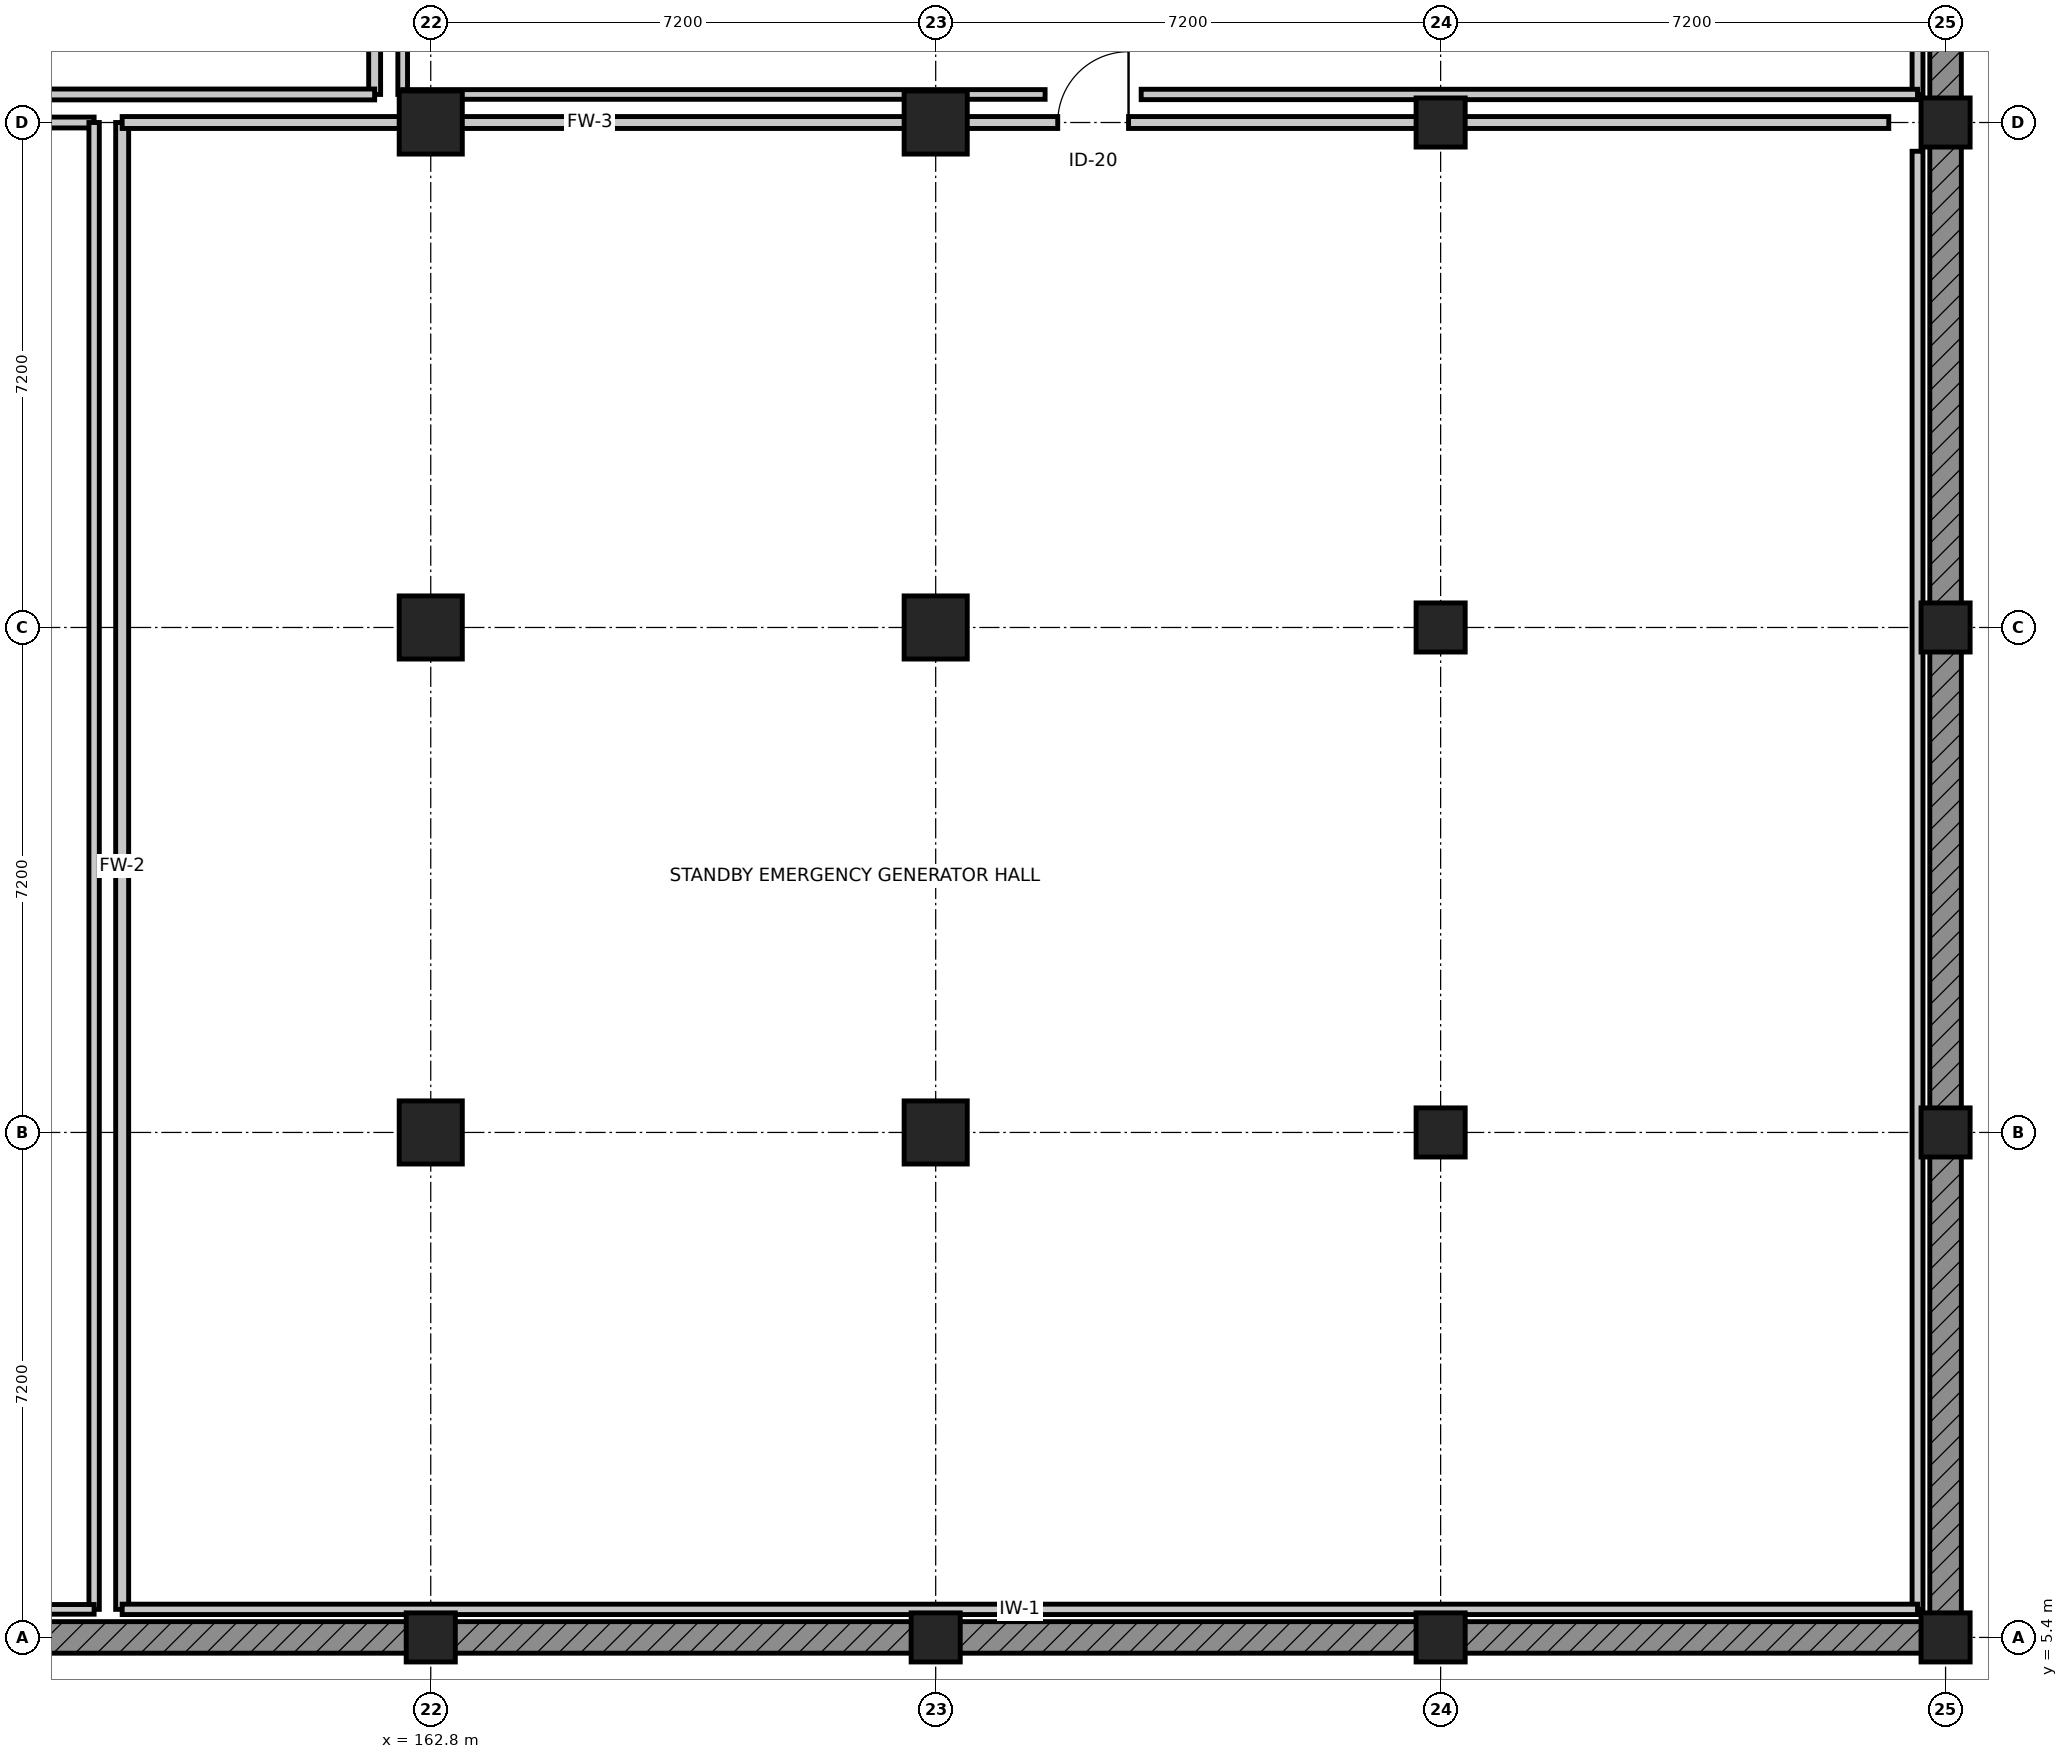
"""IFC4 building model, lengths in metres.
Left out: names, types, materials, properties, quantities, classifications, styles, units other than length and angle.
Written with IfcOpenShell. Run it as: python <this file> out.ifc"""

import sys

from ifc_helpers import new_model, si_unit, direction, frame, frame_2d, origin, origin_2d, place, context, subcontext, project, spatial, rectangle, extrude, element, fill, save


model = new_model("IFC4")
c1 = context("Model", 3, precision=1e-05, world=origin(), true_north=direction((0.0, 1.0)))
c2 = subcontext(c1, "Body", "Model", "MODEL_VIEW")
j1 = project(units=[si_unit("LENGTHUNIT", "METRE"), si_unit("PLANEANGLEUNIT", "RADIAN")], contexts=[c1])
p1 = place(None, origin())
s1 = spatial("IfcSite", under=j1, at=p1, CompositionType="ELEMENT")
p2 = place(p1, origin())
s2 = spatial("IfcBuilding", under=s1, at=p2, CompositionType="ELEMENT")
p3 = place(p2, frame((0.0, 0.0, -4.5)))
s3 = spatial("IfcBuildingStorey", under=s2, at=p3, CompositionType="ELEMENT", Elevation=-4.5)
p4 = place(p3, frame((162.8, 5.4, 0.0), z_axis=(0.0, 0.0, 1.0), x_axis=(1.0, 0.0, 0.0)))
e1 = element("IfcColumn", 1, at=p4, inside=s3, PredefinedType="COLUMN", context=c2, shape_type="SweptSolid", body=[
    extrude(rectangle(XDim=0.7, YDim=0.7, at=origin_2d()), origin(), (0.0, 0.0, 1.0), 4.5),
])
for number, where, z_axis, x_axis in (
    (2, (162.8, 12.6, 0.0), (0.0, 0.0, 1.0), (1.0, 0.0, 0.0)),
    (3, (162.8, 19.8, 0.0), (0.0, 0.0, 1.0), (1.0, 0.0, 0.0)),
    (4, (162.8, 27.0, 0.0), (0.0, 0.0, 1.0), (1.0, 0.0, 0.0)),
):
    element("IfcColumn", number, at=place(p3, frame(where, z_axis=z_axis, x_axis=x_axis)), inside=s3, PredefinedType="COLUMN", context=c2, shape_type="SweptSolid", body=[
        extrude(rectangle(XDim=0.9, YDim=0.9, at=origin_2d()), origin(), (0.0, 0.0, 1.0), 4.5),
    ])
p5 = place(p3, frame((170.0, 5.4, 0.0), z_axis=(0.0, 0.0, 1.0), x_axis=(1.0, 0.0, 0.0)))
e5 = element("IfcColumn", 5, at=p5, inside=s3, PredefinedType="COLUMN", context=c2, shape_type="SweptSolid", body=[
    extrude(rectangle(XDim=0.7, YDim=0.7, at=origin_2d()), origin(), (0.0, 0.0, 1.0), 4.5),
])
for number, where, z_axis, x_axis in (
    (6, (170.0, 12.6, 0.0), (0.0, 0.0, 1.0), (1.0, 0.0, 0.0)),
    (7, (170.0, 19.8, 0.0), (0.0, 0.0, 1.0), (1.0, 0.0, 0.0)),
    (8, (170.0, 27.0, 0.0), (0.0, 0.0, 1.0), (1.0, 0.0, 0.0)),
):
    element("IfcColumn", number, at=place(p3, frame(where, z_axis=z_axis, x_axis=x_axis)), inside=s3, PredefinedType="COLUMN", context=c2, shape_type="SweptSolid", body=[
        extrude(rectangle(XDim=0.9, YDim=0.9, at=origin_2d()), origin(), (0.0, 0.0, 1.0), 4.5),
    ])
for number, where, z_axis, x_axis in (
    (9, (177.2, 5.4, 0.0), (0.0, 0.0, 1.0), (1.0, 0.0, 0.0)),
    (10, (177.2, 12.6, 0.0), (0.0, 0.0, 1.0), (1.0, 0.0, 0.0)),
    (11, (177.2, 19.8, 0.0), (0.0, 0.0, 1.0), (1.0, 0.0, 0.0)),
    (12, (177.2, 27.0, 0.0), (0.0, 0.0, 1.0), (1.0, 0.0, 0.0)),
    (13, (184.4, 5.4, 0.0), (0.0, 0.0, 1.0), (1.0, 0.0, 0.0)),
    (14, (184.4, 12.6, 0.0), (0.0, 0.0, 1.0), (1.0, 0.0, 0.0)),
    (15, (184.4, 19.8, 0.0), (0.0, 0.0, 1.0), (1.0, 0.0, 0.0)),
    (16, (184.4, 27.0, 0.0), (0.0, 0.0, 1.0), (1.0, 0.0, 0.0)),
):
    element("IfcColumn", number, at=place(p3, frame(where, z_axis=z_axis, x_axis=x_axis)), inside=s3, PredefinedType="COLUMN", context=c2, shape_type="SweptSolid", body=[
        extrude(rectangle(XDim=0.7, YDim=0.7, at=origin_2d()), origin(), (0.0, 0.0, 1.0), 4.5),
    ])
for number, where, z_axis, x_axis in (
    (17, (184.4, 34.2, 0.0), (0.0, 0.0, 1.0), (0.0, -1.0, 0.0)),
    (18, (184.4, 27.0, 0.0), (0.0, 0.0, 1.0), (0.0, -1.0, 0.0)),
    (19, (184.4, 19.8, 0.0), (0.0, 0.0, 1.0), (0.0, -1.0, 0.0)),
):
    element("IfcWall", number, at=place(p3, frame(where, z_axis=z_axis, x_axis=x_axis)), inside=s3, PredefinedType="SOLIDWALL", context=c2, shape_type="SweptSolid", body=[
        extrude(rectangle(XDim=7.2, YDim=0.45, at=frame_2d((3.6, 0.0))), origin(), (0.0, 0.0, 1.0), 4.2),
    ])
p6 = place(p3, frame((184.4, 12.6, 0.0), z_axis=(0.0, 0.0, 1.0), x_axis=(0.0, -1.0, 0.0)))
e20 = element("IfcWall", 20, at=p6, inside=s3, PredefinedType="SOLIDWALL", context=c2, shape_type="SweptSolid", body=[
    extrude(rectangle(XDim=7.2, YDim=0.45, at=frame_2d((3.6, 0.0))), origin(), (0.0, 0.0, 1.0), 4.2),
])
for number, where, z_axis, x_axis in (
    (21, (184.4, 5.4, 0.0), (0.0, 0.0, 1.0), (-1.0, 0.0, 0.0)),
    (22, (177.2, 5.4, 0.0), (0.0, 0.0, 1.0), (-1.0, 0.0, 0.0)),
    (23, (170.0, 5.4, 0.0), (0.0, 0.0, 1.0), (-1.0, 0.0, 0.0)),
    (24, (162.8, 5.4, 0.0), (0.0, 0.0, 1.0), (-1.0, 0.0, 0.0)),
):
    element("IfcWall", number, at=place(p3, frame(where, z_axis=z_axis, x_axis=x_axis)), inside=s3, PredefinedType="SOLIDWALL", context=c2, shape_type="SweptSolid", body=[
        extrude(rectangle(XDim=7.2, YDim=0.45, at=frame_2d((3.6, 0.0))), origin(), (0.0, 0.0, 1.0), 4.2),
    ])
p7 = place(p3, frame((134.81, 27.0, 0.0), z_axis=(0.0, 0.0, 1.0), x_axis=(1.0, 0.0, 0.0)))
e25 = element("IfcWall", 25, at=p7, inside=s3, PredefinedType="PARTITIONING", context=c2, shape_type="SweptSolid", body=[
    extrude(rectangle(XDim=23.19, YDim=0.155, at=frame_2d((11.595, 0.0))), origin(), (0.0, 0.0, 1.0), 3.648),
])
p8 = place(p7, frame((10.86, 0.0, 0.0)))
e26 = element("IfcOpeningElement", 26, at=p8, cuts=e25, PredefinedType="OPENING", context=c2, shape_type="SweptSolid", body=[
    extrude(rectangle(XDim=0.97, YDim=2.16, at=frame_2d((0.485, 1.08))), frame((0.0, 0.087, 0.0), z_axis=(0.0, -1.0, 0.0), x_axis=(1.0, 0.0, 0.0)), (0.0, 0.0, 1.0), 0.175),
])
p9 = place(p3, frame((158.0, 27.0, 0.0), z_axis=(0.0, 0.0, 1.0), x_axis=(0.0, -1.0, 0.0)))
e27 = element("IfcWall", 27, at=p9, inside=s3, PredefinedType="PARTITIONING", context=c2, shape_type="SweptSolid", body=[
    extrude(rectangle(XDim=21.2, YDim=0.148, at=frame_2d((10.6, 0.0))), origin(), (0.0, 0.0, 1.0), 3.648),
])
p10 = place(p3, frame((158.0, 5.8, 0.0), z_axis=(0.0, 0.0, 1.0), x_axis=(-1.0, 0.0, 0.0)))
e28 = element("IfcWall", 28, at=p10, inside=s3, PredefinedType="PARTITIONING", context=c2, shape_type="SweptSolid", body=[
    extrude(rectangle(XDim=23.6, YDim=0.138, at=frame_2d((11.8, 0.0))), origin(), (0.0, 0.0, 1.0), 3.648),
])
p11 = place(p3, frame((158.4, 5.8, 0.0), z_axis=(0.0, 0.0, 1.0), x_axis=(0.0, 1.0, 0.0)))
e29 = element("IfcWall", 29, at=p11, inside=s3, PredefinedType="PARTITIONING", context=c2, shape_type="SweptSolid", body=[
    extrude(rectangle(XDim=21.2, YDim=0.185, at=frame_2d((10.6, 0.0))), origin(), (0.0, 0.0, 1.0), 3.648),
])
p12 = place(p3, frame((158.4, 27.0, 0.0), z_axis=(0.0, 0.0, 1.0), x_axis=(1.0, 0.0, 0.0)))
e30 = element("IfcWall", 30, at=p12, inside=s3, PredefinedType="PARTITIONING", context=c2, shape_type="SweptSolid", body=[
    extrude(rectangle(XDim=25.19, YDim=0.17, at=frame_2d((12.595, 0.0))), origin(), (0.0, 0.0, 1.0), 3.648),
])
p13 = place(p12, frame((13.34, 0.0, 0.0)))
e31 = element("IfcOpeningElement", 31, at=p13, cuts=e30, PredefinedType="OPENING", context=c2, shape_type="SweptSolid", body=[
    extrude(rectangle(XDim=1.01, YDim=2.16, at=frame_2d((0.505, 1.08))), frame((0.0, 0.095, 0.0), z_axis=(0.0, -1.0, 0.0), x_axis=(1.0, 0.0, 0.0)), (0.0, 0.0, 1.0), 0.19),
])
p14 = place(p3, frame((184.0, 26.59, 0.0), z_axis=(0.0, 0.0, 1.0), x_axis=(0.0, -1.0, 0.0)))
e32 = element("IfcWall", 32, at=p14, inside=s3, PredefinedType="PARTITIONING", context=c2, shape_type="SweptSolid", body=[
    extrude(rectangle(XDim=20.79, YDim=0.155, at=frame_2d((10.395, 0.0))), origin(), (0.0, 0.0, 1.0), 3.648),
])
p15 = place(p3, frame((184.0, 5.8, 0.0), z_axis=(0.0, 0.0, 1.0), x_axis=(-1.0, 0.0, 0.0)))
e33 = element("IfcWall", 33, at=p15, inside=s3, PredefinedType="PARTITIONING", context=c2, shape_type="SweptSolid", body=[
    extrude(rectangle(XDim=25.6, YDim=0.148, at=frame_2d((12.8, 0.0))), origin(), (0.0, 0.0, 1.0), 3.648),
])
p16 = place(p3, frame((162.0, 49.0, 0.0), z_axis=(0.0, 0.0, 1.0), x_axis=(0.0, -1.0, 0.0)))
e34 = element("IfcWall", 34, at=p16, inside=s3, PredefinedType="PARTITIONING", context=c2, shape_type="SweptSolid", body=[
    extrude(rectangle(XDim=21.6, YDim=0.17, at=frame_2d((10.8, 0.0))), origin(), (0.0, 0.0, 1.0), 3.648),
])
p17 = place(p16, frame((10.275, 0.0, 0.0)))
e35 = element("IfcOpeningElement", 35, at=p17, cuts=e34, PredefinedType="OPENING", context=c2, shape_type="SweptSolid", body=[
    extrude(rectangle(XDim=1.05, YDim=2.18, at=frame_2d((0.525, 1.09))), frame((0.0, 0.095, 0.0), z_axis=(0.0, -1.0, 0.0), x_axis=(1.0, 0.0, 0.0)), (0.0, 0.0, 1.0), 0.19),
])
p18 = place(p3, frame((162.0, 27.4, 0.0), z_axis=(0.0, 0.0, 1.0), x_axis=(-1.0, 0.0, 0.0)))
e36 = element("IfcWall", 36, at=p18, inside=s3, PredefinedType="PARTITIONING", context=c2, shape_type="SweptSolid", body=[
    extrude(rectangle(XDim=15.18, YDim=0.155, at=frame_2d((7.59, 0.0))), origin(), (0.0, 0.0, 1.0), 3.648),
])
p19 = place(p3, frame((162.4, 27.4, 0.0), z_axis=(0.0, 0.0, 1.0), x_axis=(0.0, 1.0, 0.0)))
e37 = element("IfcWall", 37, at=p19, inside=s3, PredefinedType="PARTITIONING", context=c2, shape_type="SweptSolid", body=[
    extrude(rectangle(XDim=10.095, YDim=0.138, at=frame_2d((5.048, 0.0))), origin(), (0.0, 0.0, 1.0), 3.648),
])
p20 = place(p3, frame((184.0, 49.0, 0.0), z_axis=(0.0, 0.0, 1.0), x_axis=(0.0, -1.0, 0.0)))
e38 = element("IfcWall", 38, at=p20, inside=s3, PredefinedType="PARTITIONING", context=c2, shape_type="SweptSolid", body=[
    extrude(rectangle(XDim=21.6, YDim=0.155, at=frame_2d((10.8, 0.0))), origin(), (0.0, 0.0, 1.0), 3.648),
])
p21 = place(p3, frame((184.0, 27.4, 0.0), z_axis=(0.0, 0.0, 1.0), x_axis=(-1.0, 0.0, 0.0)))
e39 = element("IfcWall", 39, at=p21, inside=s3, PredefinedType="PARTITIONING", context=c2, shape_type="SweptSolid", body=[
    extrude(rectangle(XDim=11.07, YDim=0.148, at=frame_2d((5.535, 0.0))), origin(), (0.0, 0.0, 1.0), 3.648),
])
p22 = place(p3, frame((171.56, 27.4, 0.0), z_axis=(0.0, 0.0, 1.0), x_axis=(-1.0, 0.0, 0.0)))
e40 = element("IfcWall", 40, at=p22, inside=s3, PredefinedType="PARTITIONING", context=c2, shape_type="SweptSolid", body=[
    extrude(rectangle(XDim=9.16, YDim=0.138, at=frame_2d((4.58, 0.0))), origin(), (0.0, 0.0, 1.0), 3.648),
])
p23 = place(p13, origin())
e41 = element("IfcDoor", 41, at=p23, inside=s3, OperationType="SINGLE_SWING_RIGHT", PredefinedType="DOOR", context=c2, shape_type="SweptSolid", body=[
    extrude(rectangle(XDim=1.01, YDim=2.16, at=frame_2d((0.505, 1.08))), frame((0.0, 0.025, 0.0), z_axis=(0.0, -1.0, 0.0), x_axis=(1.0, 0.0, 0.0)), (0.0, 0.0, 1.0), 0.05),
])
fill(e31, e41)
save(model, sys.argv[1])
